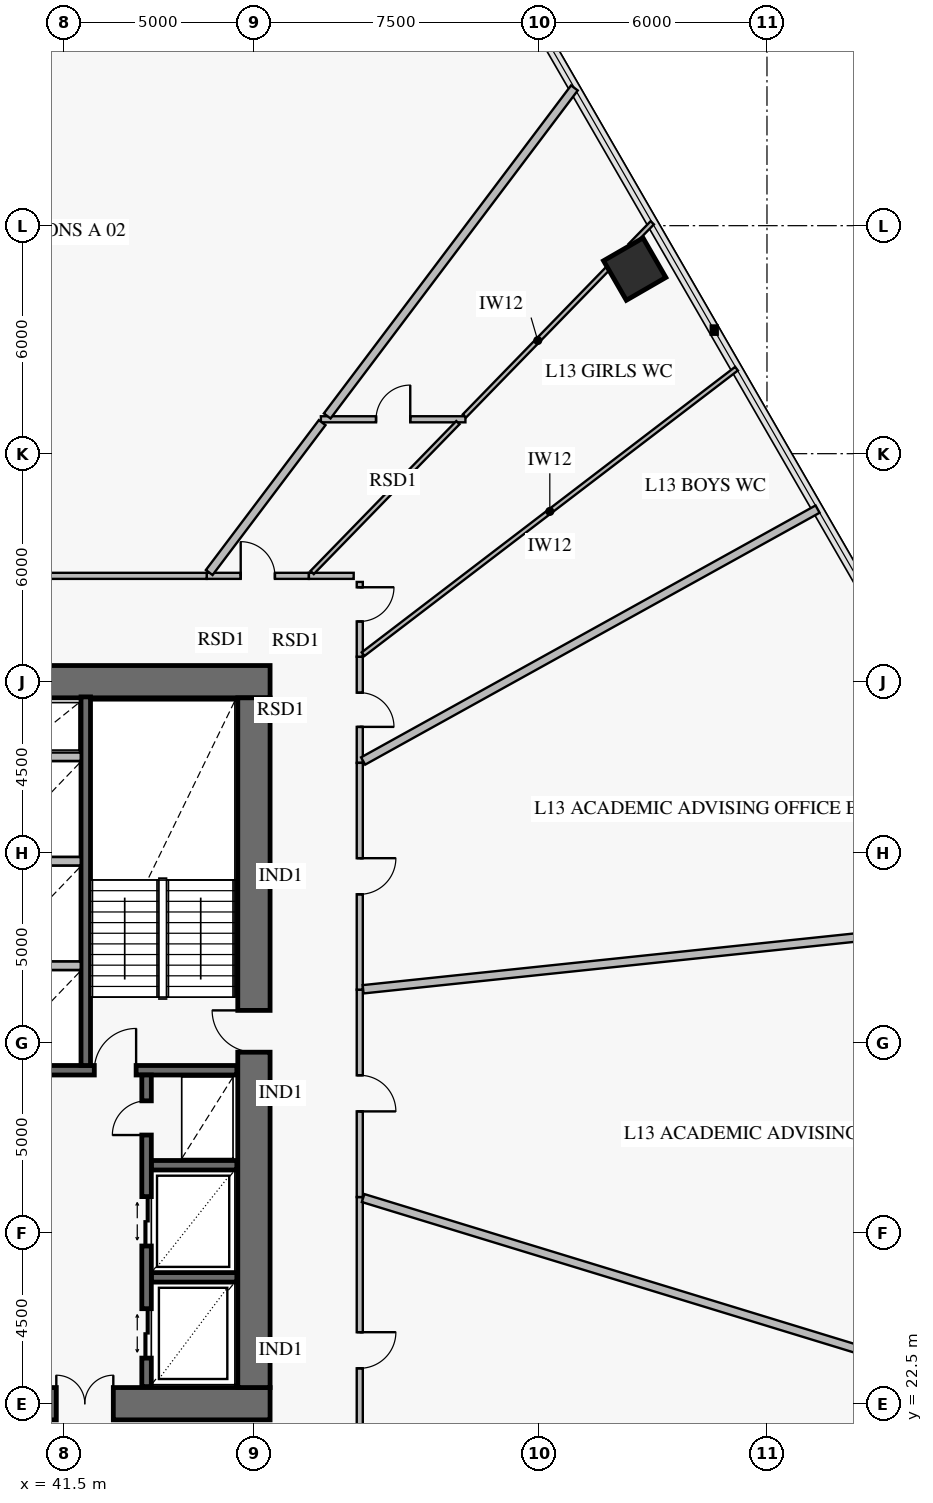
"""IFC4 building model, lengths in metres.
Left out: names, types, materials, properties, quantities, classifications, styles, units other than length and angle.
Written with IfcOpenShell. Run it as: python <this file> out.ifc"""

import sys

from ifc_helpers import new_model, si_unit, direction, frame, frame_2d, origin, origin_2d, place, context, subcontext, project, spatial, rectangle, extrude, element, fill, save


model = new_model("IFC4")
c1 = context("Model", 3, precision=1e-05, world=origin(), true_north=direction((0.0, 1.0)))
c2 = subcontext(c1, "Body", "Model", "MODEL_VIEW")
j1 = project(units=[si_unit("LENGTHUNIT", "METRE"), si_unit("PLANEANGLEUNIT", "RADIAN")], contexts=[c1])
p1 = place(None, origin())
s1 = spatial("IfcSite", under=j1, at=p1, CompositionType="ELEMENT")
p2 = place(p1, origin())
s2 = spatial("IfcBuilding", under=s1, at=p2, CompositionType="ELEMENT")
p3 = place(p2, frame((0.0, 0.0, 54.0)))
s3 = spatial("IfcBuildingStorey", under=s2, at=p3, CompositionType="ELEMENT", Elevation=54.0)
p4 = place(p3, frame((37.35, 22.5, 0.0), z_axis=(0.0, 0.0, 1.0), x_axis=(1.0, 0.0, 0.0)))
e1 = element("IfcWall", 1, at=p4, inside=s3, PredefinedType="SHEAR", context=c2, shape_type="SweptSolid", body=[
    extrude(rectangle(XDim=9.575, YDim=0.85, at=frame_2d((4.788, 0.0))), origin(), (0.0, 0.0, 1.0), 4.2),
])
p5 = place(p4, frame((3.95, 0.0, 0.0)))
e2 = element("IfcOpeningElement", 2, at=p5, cuts=e1, PredefinedType="OPENING", context=c2, shape_type="SweptSolid", body=[
    extrude(rectangle(XDim=1.5, YDim=2.15, at=frame_2d((0.75, 1.075))), frame((0.0, 0.437, 0.0), z_axis=(0.0, -1.0, 0.0), x_axis=(1.0, 0.0, 0.0)), (0.0, 0.0, 1.0), 0.874),
])
p6 = place(p3, frame((46.925, 41.5, 0.0), z_axis=(0.0, 0.0, 1.0), x_axis=(-1.0, 0.0, 0.0)))
e3 = element("IfcWall", 3, at=p6, inside=s3, PredefinedType="SHEAR", context=c2, shape_type="SweptSolid", body=[
    extrude(rectangle(XDim=7.975, YDim=0.85, at=frame_2d((3.988, 0.0))), origin(), (0.0, 0.0, 1.0), 4.2),
])
p7 = place(p3, frame((46.5, 22.925, 0.0), z_axis=(0.0, 0.0, 1.0), x_axis=(0.0, 1.0, 0.0)))
e4 = element("IfcWall", 4, at=p7, inside=s3, PredefinedType="SHEAR", context=c2, shape_type="SweptSolid", body=[
    extrude(rectangle(XDim=18.15, YDim=0.85, at=frame_2d((9.075, 0.0))), origin(), (0.0, 0.0, 1.0), 4.2),
])
p8 = place(p7, frame((8.825, 0.0, 0.0)))
e5 = element("IfcOpeningElement", 5, at=p8, cuts=e4, PredefinedType="OPENING", context=c2, shape_type="SweptSolid", body=[
    extrude(rectangle(XDim=1.1, YDim=2.15, at=frame_2d((0.55, 1.075))), frame((0.0, 0.437, 0.0), z_axis=(0.0, -1.0, 0.0), x_axis=(1.0, 0.0, 0.0)), (0.0, 0.0, 1.0), 0.874),
])
p9 = place(p3, frame((56.519, 52.357, 0.0), z_axis=(0.0, 0.0, 1.0), x_axis=(-0.5, 0.866025403784, 0.0)))
e6 = element("IfcColumn", 6, at=p9, inside=s3, PredefinedType="COLUMN", context=c2, shape_type="SweptSolid", body=[
    extrude(rectangle(XDim=1.2, YDim=1.2, at=origin_2d()), origin(), (0.0, 0.0, 1.0), 3.92),
])
p10 = place(p3, frame((25.95, 31.275, 0.0), z_axis=(0.0, 0.0, 1.0), x_axis=(1.0, 0.0, 0.0)))
e7 = element("IfcWall", 7, at=p10, inside=s3, PredefinedType="SOLIDWALL", context=c2, shape_type="SweptSolid", body=[
    extrude(rectangle(XDim=20.1, YDim=0.25, at=frame_2d((10.05, 0.0))), origin(), (0.0, 0.0, 1.0), 4.2),
])
p11 = place(p10, frame((2.6, 0.0, 0.0)))
e8 = element("IfcOpeningElement", 8, at=p11, cuts=e7, PredefinedType="OPENING", context=c2, shape_type="SweptSolid", body=[
    extrude(rectangle(XDim=1.1, YDim=2.15, at=frame_2d((0.55, 1.075))), frame((0.0, 0.137, 0.0), z_axis=(0.0, -1.0, 0.0), x_axis=(1.0, 0.0, 0.0)), (0.0, 0.0, 1.0), 0.274),
])
p12 = place(p10, frame((10.6, 0.0, 0.0)))
e9 = element("IfcOpeningElement", 9, at=p12, cuts=e7, PredefinedType="OPENING", context=c2, shape_type="SweptSolid", body=[
    extrude(rectangle(XDim=1.1, YDim=2.15, at=frame_2d((0.55, 1.075))), frame((0.0, 0.137, 0.0), z_axis=(0.0, -1.0, 0.0), x_axis=(1.0, 0.0, 0.0)), (0.0, 0.0, 1.0), 0.274),
])
p13 = place(p10, frame((16.35, 0.0, 0.0)))
e10 = element("IfcOpeningElement", 10, at=p13, cuts=e7, PredefinedType="OPENING", context=c2, shape_type="SweptSolid", body=[
    extrude(rectangle(XDim=1.1, YDim=2.15, at=frame_2d((0.55, 1.075))), frame((0.0, 0.137, 0.0), z_axis=(0.0, -1.0, 0.0), x_axis=(1.0, 0.0, 0.0)), (0.0, 0.0, 1.0), 0.274),
])
p14 = place(p3, frame((42.075, 31.4, 0.0), z_axis=(0.0, 0.0, 1.0), x_axis=(0.0, 1.0, 0.0)))
e11 = element("IfcWall", 11, at=p14, inside=s3, PredefinedType="SOLIDWALL", context=c2, shape_type="SweptSolid", body=[
    extrude(rectangle(XDim=9.7, YDim=0.25, at=frame_2d((4.85, 0.0))), origin(), (0.0, 0.0, 1.0), 4.2),
])
for number, where, z_axis, x_axis in (
    (12, (43.8, 25.825, 0.0), (0.0, 0.0, 1.0), (1.0, 0.0, 0.0)),
    (13, (43.8, 28.775, 0.0), (0.0, 0.0, 1.0), (1.0, 0.0, 0.0)),
):
    element("IfcWall", number, at=place(p3, frame(where, z_axis=z_axis, x_axis=x_axis)), inside=s3, PredefinedType="SOLIDWALL", context=c2, shape_type="SweptSolid", body=[
        extrude(rectangle(XDim=2.25, YDim=0.25, at=frame_2d((1.125, 0.0))), origin(), (0.0, 0.0, 1.0), 4.2),
    ])
p15 = place(p3, frame((43.675, 22.95, 0.0), z_axis=(0.0, 0.0, 1.0), x_axis=(0.0, 1.0, 0.0)))
e14 = element("IfcWall", 14, at=p15, inside=s3, PredefinedType="SOLIDWALL", context=c2, shape_type="SweptSolid", body=[
    extrude(rectangle(XDim=8.2, YDim=0.25, at=frame_2d((4.1, 0.0))), origin(), (0.0, 0.0, 1.0), 4.2),
])
p16 = place(p15, frame((0.75, 0.0, 0.0)))
e15 = element("IfcOpeningElement", 15, at=p16, cuts=e14, PredefinedType="OPENING", context=c2, shape_type="SweptSolid", body=[
    extrude(rectangle(XDim=1.3, YDim=2.3, at=frame_2d((0.65, 1.15))), frame((0.0, 0.137, 0.0), z_axis=(0.0, -1.0, 0.0), x_axis=(1.0, 0.0, 0.0)), (0.0, 0.0, 1.0), 0.274),
])
p17 = place(p15, frame((3.7, 0.0, 0.0)))
e16 = element("IfcOpeningElement", 16, at=p17, cuts=e14, PredefinedType="OPENING", context=c2, shape_type="SweptSolid", body=[
    extrude(rectangle(XDim=1.3, YDim=2.3, at=frame_2d((0.65, 1.15))), frame((0.0, 0.137, 0.0), z_axis=(0.0, -1.0, 0.0), x_axis=(1.0, 0.0, 0.0)), (0.0, 0.0, 1.0), 0.274),
])
p18 = place(p15, frame((6.62, 0.0, 0.0)))
e17 = element("IfcOpeningElement", 17, at=p18, cuts=e14, PredefinedType="OPENING", context=c2, shape_type="SweptSolid", body=[
    extrude(rectangle(XDim=0.9, YDim=2.1, at=frame_2d((0.45, 1.05))), frame((0.0, 0.137, 0.0), z_axis=(0.0, -1.0, 0.0), x_axis=(1.0, 0.0, 0.0)), (0.0, 0.0, 1.0), 0.274),
])
p19 = place(p3, frame((49.285, 39.364, 0.0), z_axis=(0.0, 0.0, 1.0), x_axis=(0.0, 1.0, 0.0)))
e18 = element("IfcWall", 18, at=p19, inside=s3, PredefinedType="PARTITIONING", context=c2, shape_type="SweptSolid", body=[
    extrude(rectangle(XDim=2.793, YDim=0.16, at=frame_2d((1.396, 0.0))), origin(), (0.0, 0.0, 1.0), 3.92),
])
p20 = place(p19, frame((0.947, 0.0, 0.0)))
e19 = element("IfcOpeningElement", 19, at=p20, cuts=e18, PredefinedType="OPENING", context=c2, shape_type="SweptSolid", body=[
    extrude(rectangle(XDim=0.9, YDim=2.1, at=frame_2d((0.45, 1.05))), frame((0.0, 0.092, 0.0), z_axis=(0.0, -1.0, 0.0), x_axis=(1.0, 0.0, 0.0)), (0.0, 0.0, 1.0), 0.184),
])
p21 = place(p3, frame((49.285, 42.157, 0.0), z_axis=(0.0, 0.0, 1.0), x_axis=(0.0, 1.0, 0.0)))
e20 = element("IfcWall", 20, at=p21, inside=s3, PredefinedType="PARTITIONING", context=c2, shape_type="SweptSolid", body=[
    extrude(rectangle(XDim=1.968, YDim=0.16, at=frame_2d((0.984, 0.0))), origin(), (0.0, 0.0, 1.0), 3.92),
])
p22 = place(p21, frame((0.928, 0.0, 0.0)))
e21 = element("IfcOpeningElement", 21, at=p22, cuts=e20, PredefinedType="OPENING", context=c2, shape_type="SweptSolid", body=[
    extrude(rectangle(XDim=0.9, YDim=2.1, at=frame_2d((0.45, 1.05))), frame((0.0, 0.092, 0.0), z_axis=(0.0, -1.0, 0.0), x_axis=(1.0, 0.0, 0.0)), (0.0, 0.0, 1.0), 0.184),
])
p23 = place(p3, frame((48.262, 48.405, 0.0), z_axis=(0.0, 0.0, 1.0), x_axis=(1.0, 0.0, 0.0)))
e22 = element("IfcWall", 22, at=p23, inside=s3, PredefinedType="PARTITIONING", context=c2, shape_type="SweptSolid", body=[
    extrude(rectangle(XDim=3.803, YDim=0.16, at=frame_2d((1.901, 0.0))), origin(), (0.0, 0.0, 1.0), 3.47),
])
p24 = place(p23, frame((1.451, 0.0, 0.0)))
e23 = element("IfcOpeningElement", 23, at=p24, cuts=e22, PredefinedType="OPENING", context=c2, shape_type="SweptSolid", body=[
    extrude(rectangle(XDim=0.9, YDim=2.1, at=frame_2d((0.45, 1.05))), frame((0.0, 0.092, 0.0), z_axis=(0.0, -1.0, 0.0), x_axis=(1.0, 0.0, 0.0)), (0.0, 0.0, 1.0), 0.184),
])
p25 = place(p3, frame((47.947, 44.285, 0.0), z_axis=(0.0, 0.0, 1.0), x_axis=(-1.0, 0.0, 0.0)))
e24 = element("IfcWall", 24, at=p25, inside=s3, PredefinedType="PARTITIONING", context=c2, shape_type="SweptSolid", body=[
    extrude(rectangle(XDim=2.689, YDim=0.16, at=frame_2d((1.345, 0.0))), origin(), (0.0, 0.0, 1.0), 3.92),
])
p26 = place(p25, frame((0.895, 0.0, 0.0)))
e25 = element("IfcOpeningElement", 25, at=p26, cuts=e24, PredefinedType="OPENING", context=c2, shape_type="SweptSolid", body=[
    extrude(rectangle(XDim=0.9, YDim=2.1, at=frame_2d((0.45, 1.05))), frame((0.0, 0.092, 0.0), z_axis=(0.0, -1.0, 0.0), x_axis=(1.0, 0.0, 0.0)), (0.0, 0.0, 1.0), 0.184),
])
p27 = place(p3, frame((45.257, 44.285, 0.0), z_axis=(0.0, 0.0, 1.0), x_axis=(-1.0, 0.0, 0.0)))
e26 = element("IfcWall", 26, at=p27, inside=s3, PredefinedType="PARTITIONING", context=c2, shape_type="SweptSolid", body=[
    extrude(rectangle(XDim=11.869, YDim=0.16, at=frame_2d((5.934, 0.0))), origin(), (0.0, 0.0, 1.0), 3.22),
])
p28 = place(p27, frame((5.184, 0.0, 0.0)))
e27 = element("IfcOpeningElement", 27, at=p28, cuts=e26, PredefinedType="OPENING", context=c2, shape_type="SweptSolid", body=[
    extrude(rectangle(XDim=1.5, YDim=2.15, at=frame_2d((0.75, 1.075))), frame((0.0, 0.092, 0.0), z_axis=(0.0, -1.0, 0.0), x_axis=(1.0, 0.0, 0.0)), (0.0, 0.0, 1.0), 0.184),
])
p29 = place(p3, frame((49.285, 19.875, 0.0), z_axis=(0.0, 0.0, 1.0), x_axis=(0.0, 1.0, 0.0)))
e28 = element("IfcWall", 28, at=p29, inside=s3, PredefinedType="PARTITIONING", context=c2, shape_type="SweptSolid", body=[
    extrude(rectangle(XDim=8.063, YDim=0.16, at=frame_2d((4.032, 0.0))), origin(), (0.0, 0.0, 1.0), 3.92),
])
p30 = place(p29, frame((3.557, 0.0, 0.0)))
e29 = element("IfcOpeningElement", 29, at=p30, cuts=e28, PredefinedType="OPENING", context=c2, shape_type="SweptSolid", body=[
    extrude(rectangle(XDim=0.95, YDim=2.1, at=frame_2d((0.475, 1.05))), frame((0.0, 0.092, 0.0), z_axis=(0.0, -1.0, 0.0), x_axis=(1.0, 0.0, 0.0)), (0.0, 0.0, 1.0), 0.184),
])
p31 = place(p3, frame((49.285, 27.938, 0.0), z_axis=(0.0, 0.0, 1.0), x_axis=(0.0, 1.0, 0.0)))
e30 = element("IfcWall", 30, at=p31, inside=s3, PredefinedType="PARTITIONING", context=c2, shape_type="SweptSolid", body=[
    extrude(rectangle(XDim=5.458, YDim=0.16, at=frame_2d((2.729, 0.0))), origin(), (0.0, 0.0, 1.0), 3.22),
])
p32 = place(p31, frame((2.254, 0.0, 0.0)))
e31 = element("IfcOpeningElement", 31, at=p32, cuts=e30, PredefinedType="OPENING", context=c2, shape_type="SweptSolid", body=[
    extrude(rectangle(XDim=0.95, YDim=2.1, at=frame_2d((0.475, 1.05))), frame((0.0, 0.092, 0.0), z_axis=(0.0, -1.0, 0.0), x_axis=(1.0, 0.0, 0.0)), (0.0, 0.0, 1.0), 0.184),
])
p33 = place(p3, frame((49.285, 33.396, 0.0), z_axis=(0.0, 0.0, 1.0), x_axis=(0.0, 1.0, 0.0)))
e32 = element("IfcWall", 32, at=p33, inside=s3, PredefinedType="PARTITIONING", context=c2, shape_type="SweptSolid", body=[
    extrude(rectangle(XDim=5.968, YDim=0.16, at=frame_2d((2.984, 0.0))), origin(), (0.0, 0.0, 1.0), 3.22),
])
p34 = place(p33, frame((2.509, 0.0, 0.0)))
e33 = element("IfcOpeningElement", 33, at=p34, cuts=e32, PredefinedType="OPENING", context=c2, shape_type="SweptSolid", body=[
    extrude(rectangle(XDim=0.95, YDim=2.1, at=frame_2d((0.475, 1.05))), frame((0.0, 0.092, 0.0), z_axis=(0.0, -1.0, 0.0), x_axis=(1.0, 0.0, 0.0)), (0.0, 0.0, 1.0), 0.184),
])
for number, where, z_axis, x_axis in (
    (34, (39.558, 34.025, 0.0), (0.0, 0.0, 1.0), (1.0, 0.0, 0.0)),
    (35, (39.558, 36.775, 0.0), (0.0, 0.0, 1.0), (1.0, 0.0, 0.0)),
    (36, (39.558, 39.525, 0.0), (0.0, 0.0, 1.0), (1.0, 0.0, 0.0)),
):
    element("IfcWall", number, at=place(p3, frame(where, z_axis=z_axis, x_axis=x_axis)), inside=s3, PredefinedType="PARTITIONING", context=c2, shape_type="SweptSolid", body=[
        extrude(rectangle(XDim=2.384, YDim=0.22, at=frame_2d((1.192, 0.0))), origin(), (0.0, 0.0, 1.0), 3.92),
    ])
p35 = place(p3, frame((49.373, 39.413, 0.0), z_axis=(0.0, 0.0, 1.0), x_axis=(0.874620963666, 0.484807353405, 0.0)))
e37 = element("IfcWall", 37, at=p35, inside=s3, PredefinedType="PARTITIONING", context=c2, shape_type="SweptSolid", body=[
    extrude(rectangle(XDim=13.673, YDim=0.22, at=frame_2d((6.836, 0.0))), origin(), (0.0, 0.0, 1.0), 3.17),
])
p36 = place(p3, frame((49.373, 42.225, 0.0), z_axis=(0.0, 0.0, 1.0), x_axis=(0.794422824401, 0.607365109362, 0.0)))
e38 = element("IfcWall", 38, at=p36, inside=s3, PredefinedType="PARTITIONING", context=c2, shape_type="SweptSolid", body=[
    extrude(rectangle(XDim=12.368, YDim=0.12, at=frame_2d((6.184, 0.0))), origin(), (0.0, 0.0, 1.0), 3.17),
])
p37 = place(p3, frame((49.125, 44.285, 0.0), z_axis=(0.0, 0.0, 1.0), x_axis=(-1.0, 0.0, 0.0)))
e39 = element("IfcWall", 39, at=p37, inside=s3, PredefinedType="PARTITIONING", context=c2, shape_type="SweptSolid", body=[
    extrude(rectangle(XDim=1.178, YDim=0.16, at=frame_2d((0.589, 0.0))), origin(), (0.0, 0.0, 1.0), 3.22),
])
p38 = place(p3, frame((48.032, 44.373, 0.0), z_axis=(0.0, 0.0, 1.0), x_axis=(0.697186119011, 0.716890169732, 0.0)))
e40 = element("IfcWall", 40, at=p38, inside=s3, PredefinedType="PARTITIONING", context=c2, shape_type="SweptSolid", body=[
    extrude(rectangle(XDim=5.501, YDim=0.12, at=frame_2d((2.75, 0.0))), origin(), (0.0, 0.0, 1.0), 3.47),
])
p39 = place(p3, frame((52.039, 48.493, 0.0), z_axis=(0.0, 0.0, 1.0), x_axis=(0.697138835877, 0.716936150234, 0.0)))
e41 = element("IfcWall", 41, at=p39, inside=s3, PredefinedType="PARTITIONING", context=c2, shape_type="SweptSolid", body=[
    extrude(rectangle(XDim=5.537, YDim=0.12, at=frame_2d((2.769, 0.0))), origin(), (0.0, 0.0, 1.0), 3.92),
])
p40 = place(p3, frame((56.399, 52.977, 0.0), z_axis=(0.0, 0.0, 1.0), x_axis=(0.69724946606, 0.716828558359, 0.0)))
e42 = element("IfcWall", 42, at=p40, inside=s3, PredefinedType="PARTITIONING", context=c2, shape_type="SweptSolid", body=[
    extrude(rectangle(XDim=0.835, YDim=0.12, at=frame_2d((0.418, 0.0))), origin(), (0.0, 0.0, 1.0), 3.492),
])
p41 = place(p3, frame((45.324, 44.373, 0.0), z_axis=(0.0, 0.0, 1.0), x_axis=(0.601817794095, 0.798633421984, 0.0)))
e43 = element("IfcWall", 43, at=p41, inside=s3, PredefinedType="PARTITIONING", context=c2, shape_type="SweptSolid", body=[
    extrude(rectangle(XDim=4.938, YDim=0.22, at=frame_2d((2.469, 0.0))), origin(), (0.0, 0.0, 1.0), 3.92),
])
p42 = place(p3, frame((48.428, 48.493, 0.0), z_axis=(0.0, 0.0, 1.0), x_axis=(0.601802006389, 0.798645318715, 0.0)))
e44 = element("IfcWall", 44, at=p42, inside=s3, PredefinedType="PARTITIONING", context=c2, shape_type="SweptSolid", body=[
    extrude(rectangle(XDim=10.808, YDim=0.22, at=frame_2d((5.404, 0.0))), origin(), (0.0, 0.0, 1.0), 3.17),
])
p43 = place(p3, frame((49.373, 27.912, 0.0), z_axis=(0.0, 0.0, 1.0), x_axis=(0.956304467386, -0.292372648614, 0.0)))
e45 = element("IfcWall", 45, at=p43, inside=s3, PredefinedType="PARTITIONING", context=c2, shape_type="SweptSolid", body=[
    extrude(rectangle(XDim=15.736, YDim=0.22, at=frame_2d((7.868, 0.0))), origin(), (0.0, 0.0, 1.0), 3.17),
])
p44 = place(p3, frame((49.373, 33.406, 0.0), z_axis=(0.0, 0.0, 1.0), x_axis=(0.994521492256, 0.104532298553, 0.0)))
e46 = element("IfcWall", 46, at=p44, inside=s3, PredefinedType="PARTITIONING", context=c2, shape_type="SweptSolid", body=[
    extrude(rectangle(XDim=18.252, YDim=0.22, at=frame_2d((9.126, 0.0))), origin(), (0.0, 0.0, 1.0), 3.17),
])
p45 = place(p8, origin())
e47 = element("IfcDoor", 47, at=p45, inside=s3, OperationType="SINGLE_SWING_RIGHT", PredefinedType="USERDEFINED", context=c2, shape_type="SweptSolid", body=[
    extrude(rectangle(XDim=1.1, YDim=2.15, at=frame_2d((0.55, 1.075))), frame((0.0, 0.025, 0.0), z_axis=(0.0, -1.0, 0.0), x_axis=(1.0, 0.0, 0.0)), (0.0, 0.0, 1.0), 0.05),
])
fill(e5, e47)
p46 = place(p5, origin())
e48 = element("IfcDoor", 48, at=p46, inside=s3, OperationType="DOUBLE_DOOR_SINGLE_SWING", PredefinedType="DOOR", context=c2, shape_type="SweptSolid", body=[
    extrude(rectangle(XDim=1.5, YDim=2.15, at=frame_2d((0.75, 1.075))), frame((0.0, 0.025, 0.0), z_axis=(0.0, -1.0, 0.0), x_axis=(1.0, 0.0, 0.0)), (0.0, 0.0, 1.0), 0.05),
])
fill(e2, e48)
p47 = place(p13, origin())
e49 = element("IfcDoor", 49, at=p47, inside=s3, OperationType="SINGLE_SWING_RIGHT", PredefinedType="USERDEFINED", context=c2, shape_type="SweptSolid", body=[
    extrude(rectangle(XDim=1.1, YDim=2.15, at=frame_2d((0.55, 1.075))), frame((0.0, 0.025, 0.0), z_axis=(0.0, -1.0, 0.0), x_axis=(1.0, 0.0, 0.0)), (0.0, 0.0, 1.0), 0.05),
])
fill(e10, e49)
p48 = place(p16, origin())
e50 = element("IfcDoor", 50, at=p48, inside=s3, OperationType="DOUBLE_DOOR_SLIDING", PredefinedType="DOOR", context=c2, shape_type="SweptSolid", body=[
    extrude(rectangle(XDim=1.3, YDim=2.3, at=frame_2d((0.65, 1.15))), frame((0.0, 0.025, 0.0), z_axis=(0.0, -1.0, 0.0), x_axis=(1.0, 0.0, 0.0)), (0.0, 0.0, 1.0), 0.05),
])
fill(e15, e50)
p49 = place(p17, origin())
e51 = element("IfcDoor", 51, at=p49, inside=s3, OperationType="DOUBLE_DOOR_SLIDING", PredefinedType="DOOR", context=c2, shape_type="SweptSolid", body=[
    extrude(rectangle(XDim=1.3, YDim=2.3, at=frame_2d((0.65, 1.15))), frame((0.0, 0.025, 0.0), z_axis=(0.0, -1.0, 0.0), x_axis=(1.0, 0.0, 0.0)), (0.0, 0.0, 1.0), 0.05),
])
fill(e16, e51)
p50 = place(p18, origin())
e52 = element("IfcDoor", 52, at=p50, inside=s3, OperationType="SINGLE_SWING_LEFT", PredefinedType="DOOR", context=c2, shape_type="SweptSolid", body=[
    extrude(rectangle(XDim=0.9, YDim=2.1, at=frame_2d((0.45, 1.05))), frame((0.0, 0.025, 0.0), z_axis=(0.0, -1.0, 0.0), x_axis=(1.0, 0.0, 0.0)), (0.0, 0.0, 1.0), 0.05),
])
fill(e17, e52)
p51 = place(p20, frame((0.9, 0.0, 0.0), z_axis=(0.0, 0.0, 1.0), x_axis=(-1.0, 0.0, 0.0)))
e53 = element("IfcDoor", 53, at=p51, inside=s3, OperationType="SINGLE_SWING_RIGHT", PredefinedType="DOOR", context=c2, shape_type="SweptSolid", body=[
    extrude(rectangle(XDim=0.9, YDim=2.1, at=frame_2d((0.45, 1.05))), frame((0.0, 0.025, 0.0), z_axis=(0.0, -1.0, 0.0), x_axis=(1.0, 0.0, 0.0)), (0.0, 0.0, 1.0), 0.05),
])
fill(e19, e53)
p52 = place(p22, frame((0.9, 0.0, 0.0), z_axis=(0.0, 0.0, 1.0), x_axis=(-1.0, 0.0, 0.0)))
e54 = element("IfcDoor", 54, at=p52, inside=s3, OperationType="SINGLE_SWING_LEFT", PredefinedType="DOOR", context=c2, shape_type="SweptSolid", body=[
    extrude(rectangle(XDim=0.9, YDim=2.1, at=frame_2d((0.45, 1.05))), frame((0.0, 0.025, 0.0), z_axis=(0.0, -1.0, 0.0), x_axis=(1.0, 0.0, 0.0)), (0.0, 0.0, 1.0), 0.05),
])
fill(e21, e54)
p53 = place(p24, origin())
e55 = element("IfcDoor", 55, at=p53, inside=s3, OperationType="SINGLE_SWING_RIGHT", PredefinedType="DOOR", context=c2, shape_type="SweptSolid", body=[
    extrude(rectangle(XDim=0.9, YDim=2.1, at=frame_2d((0.45, 1.05))), frame((0.0, 0.025, 0.0), z_axis=(0.0, -1.0, 0.0), x_axis=(1.0, 0.0, 0.0)), (0.0, 0.0, 1.0), 0.05),
])
fill(e23, e55)
p54 = place(p26, frame((0.9, 0.0, 0.0), z_axis=(0.0, 0.0, 1.0), x_axis=(-1.0, 0.0, 0.0)))
e56 = element("IfcDoor", 56, at=p54, inside=s3, OperationType="SINGLE_SWING_LEFT", PredefinedType="DOOR", context=c2, shape_type="SweptSolid", body=[
    extrude(rectangle(XDim=0.9, YDim=2.1, at=frame_2d((0.45, 1.05))), frame((0.0, 0.025, 0.0), z_axis=(0.0, -1.0, 0.0), x_axis=(1.0, 0.0, 0.0)), (0.0, 0.0, 1.0), 0.05),
])
fill(e25, e56)
p55 = place(p30, frame((0.95, 0.0, 0.0), z_axis=(0.0, 0.0, 1.0), x_axis=(-1.0, 0.0, 0.0)))
e57 = element("IfcDoor", 57, at=p55, inside=s3, OperationType="SINGLE_SWING_LEFT", PredefinedType="DOOR", context=c2, shape_type="SweptSolid", body=[
    extrude(rectangle(XDim=0.95, YDim=2.1, at=frame_2d((0.475, 1.05))), frame((0.0, 0.025, 0.0), z_axis=(0.0, -1.0, 0.0), x_axis=(1.0, 0.0, 0.0)), (0.0, 0.0, 1.0), 0.05),
])
fill(e29, e57)
p56 = place(p32, frame((0.95, 0.0, 0.0), z_axis=(0.0, 0.0, 1.0), x_axis=(-1.0, 0.0, 0.0)))
e58 = element("IfcDoor", 58, at=p56, inside=s3, OperationType="SINGLE_SWING_RIGHT", PredefinedType="DOOR", context=c2, shape_type="SweptSolid", body=[
    extrude(rectangle(XDim=0.95, YDim=2.1, at=frame_2d((0.475, 1.05))), frame((0.0, 0.025, 0.0), z_axis=(0.0, -1.0, 0.0), x_axis=(1.0, 0.0, 0.0)), (0.0, 0.0, 1.0), 0.05),
])
fill(e31, e58)
p57 = place(p34, frame((0.95, 0.0, 0.0), z_axis=(0.0, 0.0, 1.0), x_axis=(-1.0, 0.0, 0.0)))
e59 = element("IfcDoor", 59, at=p57, inside=s3, OperationType="SINGLE_SWING_LEFT", PredefinedType="DOOR", context=c2, shape_type="SweptSolid", body=[
    extrude(rectangle(XDim=0.95, YDim=2.1, at=frame_2d((0.475, 1.05))), frame((0.0, 0.025, 0.0), z_axis=(0.0, -1.0, 0.0), x_axis=(1.0, 0.0, 0.0)), (0.0, 0.0, 1.0), 0.05),
])
fill(e33, e59)
save(model, sys.argv[1])
